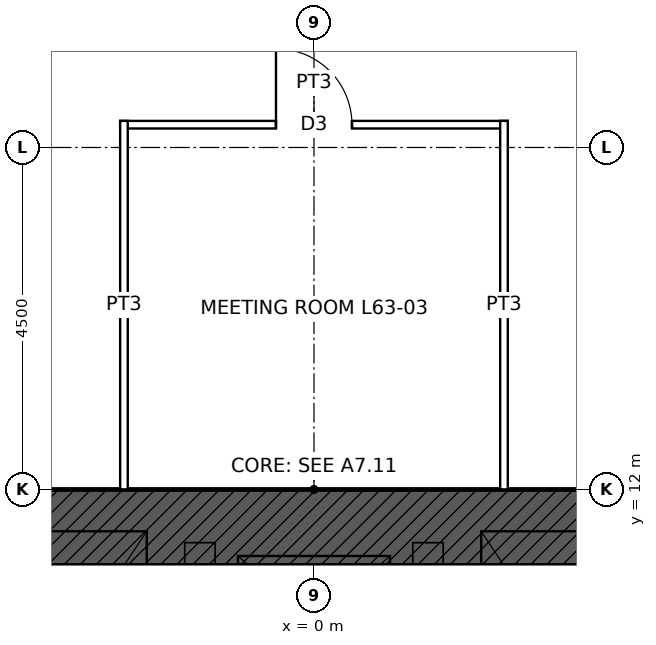
"""IFC4 building model, lengths in metres.
Left out: names, types, materials, properties, quantities, classifications, styles, units other than length and angle.
Written with IfcOpenShell. Run it as: python <this file> out.ifc"""

import sys

from ifc_helpers import new_model, si_unit, direction, frame, frame_2d, origin, place, context, subcontext, project, spatial, rectangle, extrude, element, fill, save


model = new_model("IFC4")
c1 = context("Model", 3, precision=1e-05, world=origin(), true_north=direction((0.0, 1.0)))
c2 = subcontext(c1, "Body", "Model", "MODEL_VIEW")
j1 = project(units=[si_unit("LENGTHUNIT", "METRE"), si_unit("PLANEANGLEUNIT", "RADIAN")], contexts=[c1])
p1 = place(None, origin())
s1 = spatial("IfcSite", under=j1, at=p1, CompositionType="ELEMENT")
p2 = place(p1, origin())
s2 = spatial("IfcBuilding", under=s1, at=p2, CompositionType="ELEMENT")
p3 = place(p2, frame((0.0, 0.0, 287.9)))
s3 = spatial("IfcBuildingStorey", under=s2, at=p3, CompositionType="ELEMENT", Elevation=287.9)
p4 = place(p3, frame((-12.0, 11.5, 0.0), z_axis=(0.0, 0.0, 1.0), x_axis=(1.0, 0.0, 0.0)))
e1 = element("IfcWall", 1, at=p4, inside=s3, PredefinedType="SHEAR", context=c2, shape_type="SweptSolid", body=[
    extrude(rectangle(XDim=24.0, YDim=1.0, at=frame_2d((12.0, 0.0))), origin(), (0.0, 0.0, 1.0), 4.0),
])
p5 = place(p4, frame((6.25, 0.0, 0.0)))
e2 = element("IfcOpeningElement", 2, at=p5, cuts=e1, PredefinedType="OPENING", context=c2, shape_type="SweptSolid", body=[
    extrude(rectangle(XDim=1.0, YDim=2.4, at=frame_2d((0.5, 1.2))), frame((0.0, 0.51, 0.0), z_axis=(0.0, -1.0, 0.0), x_axis=(1.0, 0.0, 0.0)), (0.0, 0.0, 1.0), 1.02),
])
p6 = place(p4, frame((16.75, 0.0, 0.0)))
e3 = element("IfcOpeningElement", 3, at=p6, cuts=e1, PredefinedType="OPENING", context=c2, shape_type="SweptSolid", body=[
    extrude(rectangle(XDim=1.0, YDim=2.4, at=frame_2d((0.5, 1.2))), frame((0.0, 0.51, 0.0), z_axis=(0.0, -1.0, 0.0), x_axis=(1.0, 0.0, 0.0)), (0.0, 0.0, 1.0), 1.02),
])
p7 = place(p3, frame((-2.55, 16.8, 0.0), z_axis=(0.0, 0.0, 1.0), x_axis=(1.0, 0.0, 0.0)))
e4 = element("IfcWall", 4, at=p7, inside=s3, PredefinedType="PARTITIONING", context=c2, shape_type="SweptSolid", body=[
    extrude(rectangle(XDim=5.1, YDim=0.1, at=frame_2d((2.55, 0.0))), origin(), (0.0, 0.0, 1.0), 3.85),
])
p8 = place(p7, frame((2.05, 0.0, 0.0)))
e5 = element("IfcOpeningElement", 5, at=p8, cuts=e4, PredefinedType="OPENING", context=c2, shape_type="SweptSolid", body=[
    extrude(rectangle(XDim=1.0, YDim=2.1, at=frame_2d((0.5, 1.05))), frame((0.0, 0.06, 0.0), z_axis=(0.0, -1.0, 0.0), x_axis=(1.0, 0.0, 0.0)), (0.0, 0.0, 1.0), 0.12),
])
for number, where, z_axis, x_axis in (
    (6, (-2.5, 12.0, 0.0), (0.0, 0.0, 1.0), (0.0, 1.0, 0.0)),
    (7, (2.5, 12.0, 0.0), (0.0, 0.0, 1.0), (0.0, 1.0, 0.0)),
):
    element("IfcWall", number, at=place(p3, frame(where, z_axis=z_axis, x_axis=x_axis)), inside=s3, PredefinedType="PARTITIONING", context=c2, shape_type="SweptSolid", body=[
        extrude(rectangle(XDim=4.85, YDim=0.1, at=frame_2d((2.425, 0.0))), origin(), (0.0, 0.0, 1.0), 3.85),
    ])
p9 = place(p8, origin())
e8 = element("IfcDoor", 8, at=p9, inside=s3, OperationType="SINGLE_SWING_LEFT", PredefinedType="DOOR", context=c2, shape_type="SweptSolid", body=[
    extrude(rectangle(XDim=1.0, YDim=2.1, at=frame_2d((0.5, 1.05))), frame((0.0, 0.025, 0.0), z_axis=(0.0, -1.0, 0.0), x_axis=(1.0, 0.0, 0.0)), (0.0, 0.0, 1.0), 0.05),
])
fill(e5, e8)
save(model, sys.argv[1])
